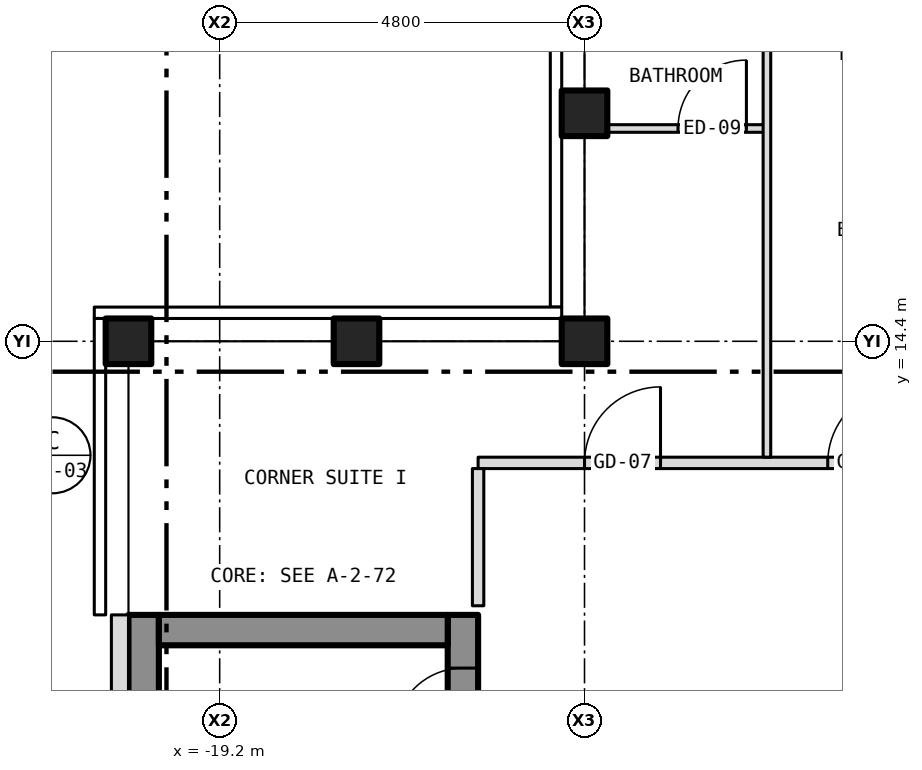
"""IFC4 building model, lengths in metres.
Left out: names, types, materials, properties, quantities, classifications, styles, units other than length and angle.
Written with IfcOpenShell. Run it as: python <this file> out.ifc"""

import sys

from ifc_helpers import new_model, si_unit, direction, frame, frame_2d, origin, origin_2d, place, context, subcontext, project, spatial, rectangle, hollow_rectangle, extrude, element, fill, save


model = new_model("IFC4")
c1 = context("Model", 3, precision=1e-05, world=origin(), true_north=direction((0.0, 1.0)))
c2 = subcontext(c1, "Body", "Model", "MODEL_VIEW")
j1 = project(units=[si_unit("LENGTHUNIT", "METRE"), si_unit("PLANEANGLEUNIT", "RADIAN")], contexts=[c1])
p1 = place(None, origin())
s1 = spatial("IfcSite", under=j1, at=p1, CompositionType="ELEMENT")
p2 = place(p1, origin())
s2 = spatial("IfcBuilding", under=s1, at=p2, CompositionType="ELEMENT")
p3 = place(p2, frame((0.0, 0.0, 262.0)))
s3 = spatial("IfcBuildingStorey", under=s2, at=p3, CompositionType="ELEMENT", Elevation=262.0)
for number, where, z_axis, x_axis in (
    (1, (-20.4, 14.4, -0.15), (0.0, 0.0, 1.0), (1.0, 0.0, 0.0)),
    (2, (-14.4, 14.4, -0.15), (0.0, 0.0, 1.0), (1.0, 0.0, 0.0)),
    (3, (-14.4, 17.4, -0.15), (0.0, 0.0, 1.0), (1.0, 0.0, 0.0)),
    (4, (-17.4, 14.4, -0.15), (0.0, 0.0, 1.0), (1.0, 0.0, 0.0)),
):
    element("IfcColumn", number, at=place(p3, frame(where, z_axis=z_axis, x_axis=x_axis)), inside=s3, PredefinedType="COLUMN", context=c2, shape_type="SweptSolid", body=[
        extrude(hollow_rectangle(XDim=0.6, YDim=0.6, WallThickness=0.03, at=origin_2d()), origin(), (0.0, 0.0, 1.0), 3.4),
    ])
p4 = place(p3, frame((-16.0, -10.8, 0.0), z_axis=(0.0, 0.0, 1.0), x_axis=(0.0, 1.0, 0.0)))
e5 = element("IfcWall", 5, at=p4, inside=s3, PredefinedType="SHEAR", context=c2, shape_type="SweptSolid", body=[
    extrude(rectangle(XDim=21.6, YDim=0.4, at=frame_2d((10.8, 0.0))), origin(), (0.0, 0.0, 1.0), 3.25),
])
p5 = place(p4, frame((9.4, 0.0, 0.0)))
e6 = element("IfcOpeningElement", 6, at=p5, cuts=e5, PredefinedType="OPENING", context=c2, shape_type="SweptSolid", body=[
    extrude(rectangle(XDim=1.1, YDim=2.1, at=frame_2d((0.55, 1.05))), frame((0.0, 0.212, 0.0), z_axis=(0.0, -1.0, 0.0), x_axis=(1.0, 0.0, 0.0)), (0.0, 0.0, 1.0), 0.424),
])
p6 = place(p4, frame((11.5, 0.0, 0.0)))
e7 = element("IfcOpeningElement", 7, at=p6, cuts=e5, PredefinedType="OPENING", context=c2, shape_type="SweptSolid", body=[
    extrude(rectangle(XDim=1.1, YDim=2.1, at=frame_2d((0.55, 1.05))), frame((0.0, 0.212, 0.0), z_axis=(0.0, -1.0, 0.0), x_axis=(1.0, 0.0, 0.0)), (0.0, 0.0, 1.0), 0.424),
])
p7 = place(p4, frame((13.6, 0.0, 0.0)))
e8 = element("IfcOpeningElement", 8, at=p7, cuts=e5, PredefinedType="OPENING", context=c2, shape_type="SweptSolid", body=[
    extrude(rectangle(XDim=1.1, YDim=2.1, at=frame_2d((0.55, 1.05))), frame((0.0, 0.212, 0.0), z_axis=(0.0, -1.0, 0.0), x_axis=(1.0, 0.0, 0.0)), (0.0, 0.0, 1.0), 0.424),
])
p8 = place(p4, frame((15.7, 0.0, 0.0)))
e9 = element("IfcOpeningElement", 9, at=p8, cuts=e5, PredefinedType="OPENING", context=c2, shape_type="SweptSolid", body=[
    extrude(rectangle(XDim=1.1, YDim=2.1, at=frame_2d((0.55, 1.05))), frame((0.0, 0.212, 0.0), z_axis=(0.0, -1.0, 0.0), x_axis=(1.0, 0.0, 0.0)), (0.0, 0.0, 1.0), 0.424),
])
p9 = place(p4, frame((17.8, 0.0, 0.0)))
e10 = element("IfcOpeningElement", 10, at=p9, cuts=e5, PredefinedType="OPENING", context=c2, shape_type="SweptSolid", body=[
    extrude(rectangle(XDim=1.1, YDim=2.1, at=frame_2d((0.55, 1.05))), frame((0.0, 0.212, 0.0), z_axis=(0.0, -1.0, 0.0), x_axis=(1.0, 0.0, 0.0)), (0.0, 0.0, 1.0), 0.424),
])
p10 = place(p4, frame((0.458, 0.0, 0.0)))
e11 = element("IfcOpeningElement", 11, at=p10, cuts=e5, PredefinedType="OPENING", context=c2, shape_type="SweptSolid", body=[
    extrude(rectangle(XDim=1.1, YDim=2.1, at=frame_2d((0.55, 1.05))), frame((0.0, 0.212, 0.0), z_axis=(0.0, -1.0, 0.0), x_axis=(1.0, 0.0, 0.0)), (0.0, 0.0, 1.0), 0.424),
])
p11 = place(p4, frame((7.5, 0.0, 0.0)))
e12 = element("IfcOpeningElement", 12, at=p11, cuts=e5, PredefinedType="OPENING", context=c2, shape_type="SweptSolid", body=[
    extrude(rectangle(XDim=1.1, YDim=2.1, at=frame_2d((0.55, 1.05))), frame((0.0, 0.212, 0.0), z_axis=(0.0, -1.0, 0.0), x_axis=(1.0, 0.0, 0.0)), (0.0, 0.0, 1.0), 0.424),
])
p12 = place(p4, frame((20.0, 0.0, 0.0)))
e13 = element("IfcOpeningElement", 13, at=p12, cuts=e5, PredefinedType="OPENING", context=c2, shape_type="SweptSolid", body=[
    extrude(rectangle(XDim=0.9, YDim=2.1, at=frame_2d((0.45, 1.05))), frame((0.0, 0.212, 0.0), z_axis=(0.0, -1.0, 0.0), x_axis=(1.0, 0.0, 0.0)), (0.0, 0.0, 1.0), 0.424),
])
p13 = place(p3, frame((-20.2, -10.8, 0.0), z_axis=(0.0, 0.0, 1.0), x_axis=(0.0, 1.0, 0.0)))
e14 = element("IfcWall", 14, at=p13, inside=s3, PredefinedType="SHEAR", context=c2, shape_type="SweptSolid", body=[
    extrude(rectangle(XDim=21.6, YDim=0.4, at=frame_2d((10.8, 0.0))), origin(), (0.0, 0.0, 1.0), 3.25),
])
p14 = place(p3, frame((-20.0, 10.6, 0.0), z_axis=(0.0, 0.0, 1.0), x_axis=(1.0, 0.0, 0.0)))
e15 = element("IfcWall", 15, at=p14, inside=s3, PredefinedType="SHEAR", context=c2, shape_type="SweptSolid", body=[
    extrude(rectangle(XDim=3.8, YDim=0.4, at=frame_2d((1.9, 0.0))), origin(), (0.0, 0.0, 1.0), 3.25),
])
p15 = place(p3, frame((-20.512, 10.8, 0.0), z_axis=(0.0, 0.0, 1.0), x_axis=(0.0, -1.0, 0.0)))
e16 = element("IfcWall", 16, at=p15, inside=s3, PredefinedType="SOLIDWALL", context=c2, shape_type="SweptSolid", body=[
    extrude(rectangle(XDim=21.6, YDim=0.225, at=frame_2d((10.8, 0.0))), origin(), (0.0, 0.0, 1.0), 3.5),
])
p16 = place(p15, frame((18.05, 0.0, 1.0)))
e17 = element("IfcOpeningElement", 17, at=p16, cuts=e16, PredefinedType="OPENING", context=c2, shape_type="SweptSolid", body=[
    extrude(rectangle(XDim=0.6, YDim=1.5, at=frame_2d((0.3, 0.75))), frame((0.0, 0.125, 0.0), z_axis=(0.0, -1.0, 0.0), x_axis=(1.0, 0.0, 0.0)), (0.0, 0.0, 1.0), 0.249),
])
p17 = place(p3, frame((-15.8, 12.8, 0.0), z_axis=(0.0, 0.0, 1.0), x_axis=(1.0, 0.0, 0.0)))
e18 = element("IfcWall", 18, at=p17, inside=s3, PredefinedType="PARTITIONING", context=c2, shape_type="SweptSolid", body=[
    extrude(rectangle(XDim=31.6, YDim=0.15, at=frame_2d((15.8, 0.0))), origin(), (0.0, 0.0, 1.0), 3.25),
])
p18 = place(p17, frame((4.6, 0.0, 0.0)))
e19 = element("IfcOpeningElement", 19, at=p18, cuts=e18, PredefinedType="OPENING", context=c2, shape_type="SweptSolid", body=[
    extrude(rectangle(XDim=1.0, YDim=2.1, at=frame_2d((0.5, 1.05))), frame((0.0, 0.087, 0.0), z_axis=(0.0, -1.0, 0.0), x_axis=(1.0, 0.0, 0.0)), (0.0, 0.0, 1.0), 0.174),
])
p19 = place(p17, frame((10.6, 0.0, 0.0)))
e20 = element("IfcOpeningElement", 20, at=p19, cuts=e18, PredefinedType="OPENING", context=c2, shape_type="SweptSolid", body=[
    extrude(rectangle(XDim=1.0, YDim=2.1, at=frame_2d((0.5, 1.05))), frame((0.0, 0.087, 0.0), z_axis=(0.0, -1.0, 0.0), x_axis=(1.0, 0.0, 0.0)), (0.0, 0.0, 1.0), 0.174),
])
p20 = place(p17, frame((17.8, 0.0, 0.0)))
e21 = element("IfcOpeningElement", 21, at=p20, cuts=e18, PredefinedType="OPENING", context=c2, shape_type="SweptSolid", body=[
    extrude(rectangle(XDim=1.0, YDim=2.1, at=frame_2d((0.5, 1.05))), frame((0.0, 0.087, 0.0), z_axis=(0.0, -1.0, 0.0), x_axis=(1.0, 0.0, 0.0)), (0.0, 0.0, 1.0), 0.174),
])
p21 = place(p17, frame((26.0, 0.0, 0.0)))
e22 = element("IfcOpeningElement", 22, at=p21, cuts=e18, PredefinedType="OPENING", context=c2, shape_type="SweptSolid", body=[
    extrude(rectangle(XDim=1.0, YDim=2.1, at=frame_2d((0.5, 1.05))), frame((0.0, 0.087, 0.0), z_axis=(0.0, -1.0, 0.0), x_axis=(1.0, 0.0, 0.0)), (0.0, 0.0, 1.0), 0.174),
])
p22 = place(p17, frame((1.4, 0.0, 0.0)))
e23 = element("IfcOpeningElement", 23, at=p22, cuts=e18, PredefinedType="OPENING", context=c2, shape_type="SweptSolid", body=[
    extrude(rectangle(XDim=1.0, YDim=2.1, at=frame_2d((0.5, 1.05))), frame((0.0, 0.087, 0.0), z_axis=(0.0, -1.0, 0.0), x_axis=(1.0, 0.0, 0.0)), (0.0, 0.0, 1.0), 0.174),
])
p23 = place(p17, frame((29.2, 0.0, 0.0)))
e24 = element("IfcOpeningElement", 24, at=p23, cuts=e18, PredefinedType="OPENING", context=c2, shape_type="SweptSolid", body=[
    extrude(rectangle(XDim=1.0, YDim=2.1, at=frame_2d((0.5, 1.05))), frame((0.0, 0.087, 0.0), z_axis=(0.0, -1.0, 0.0), x_axis=(1.0, 0.0, 0.0)), (0.0, 0.0, 1.0), 0.174),
])
p24 = place(p3, frame((-14.28, 17.2, 0.0), z_axis=(0.0, 0.0, 1.0), x_axis=(1.0, 0.0, 0.0)))
e25 = element("IfcWall", 25, at=p24, inside=s3, PredefinedType="PARTITIONING", context=c2, shape_type="SweptSolid", body=[
    extrude(rectangle(XDim=2.28, YDim=0.1, at=frame_2d((1.14, 0.0))), origin(), (0.0, 0.0, 1.0), 3.25),
])
p25 = place(p24, frame((1.11, 0.0, 0.0)))
e26 = element("IfcOpeningElement", 26, at=p25, cuts=e25, PredefinedType="OPENING", context=c2, shape_type="SweptSolid", body=[
    extrude(rectangle(XDim=0.9, YDim=2.1, at=frame_2d((0.45, 1.05))), frame((0.0, 0.062, 0.0), z_axis=(0.0, -1.0, 0.0), x_axis=(1.0, 0.0, 0.0)), (0.0, 0.0, 1.0), 0.124),
])
p26 = place(p3, frame((-15.8, 10.92, 0.0), z_axis=(0.0, 0.0, 1.0), x_axis=(0.0, 1.0, 0.0)))
e27 = element("IfcWall", 27, at=p26, inside=s3, PredefinedType="PARTITIONING", context=c2, shape_type="SweptSolid", body=[
    extrude(rectangle(XDim=1.805, YDim=0.15, at=frame_2d((0.903, 0.0))), origin(), (0.0, 0.0, 1.0), 3.25),
])
p27 = place(p3, frame((-12.0, 12.875, 0.0), z_axis=(0.0, 0.0, 1.0), x_axis=(0.0, 1.0, 0.0)))
e28 = element("IfcWall", 28, at=p27, inside=s3, PredefinedType="PARTITIONING", context=c2, shape_type="SweptSolid", body=[
    extrude(rectangle(XDim=7.855, YDim=0.1, at=frame_2d((3.927, 0.0))), origin(), (0.0, 0.0, 1.0), 3.25),
])
p28 = place(p12, origin())
e29 = element("IfcDoor", 29, at=p28, inside=s3, OperationType="SINGLE_SWING_LEFT", PredefinedType="DOOR", context=c2, shape_type="SweptSolid", body=[
    extrude(rectangle(XDim=0.9, YDim=2.1, at=frame_2d((0.45, 1.05))), frame((0.0, 0.025, 0.0), z_axis=(0.0, -1.0, 0.0), x_axis=(1.0, 0.0, 0.0)), (0.0, 0.0, 1.0), 0.05),
])
fill(e13, e29)
p29 = place(p18, origin())
e30 = element("IfcDoor", 30, at=p29, inside=s3, OperationType="SINGLE_SWING_RIGHT", PredefinedType="DOOR", context=c2, shape_type="SweptSolid", body=[
    extrude(rectangle(XDim=1.0, YDim=2.1, at=frame_2d((0.5, 1.05))), frame((0.0, 0.025, 0.0), z_axis=(0.0, -1.0, 0.0), x_axis=(1.0, 0.0, 0.0)), (0.0, 0.0, 1.0), 0.05),
])
fill(e19, e30)
p30 = place(p25, origin())
e31 = element("IfcDoor", 31, at=p30, inside=s3, OperationType="SINGLE_SWING_RIGHT", PredefinedType="DOOR", context=c2, shape_type="SweptSolid", body=[
    extrude(rectangle(XDim=0.9, YDim=2.1, at=frame_2d((0.45, 1.05))), frame((0.0, 0.025, 0.0), z_axis=(0.0, -1.0, 0.0), x_axis=(1.0, 0.0, 0.0)), (0.0, 0.0, 1.0), 0.05),
])
fill(e26, e31)
p31 = place(p22, origin())
e32 = element("IfcDoor", 32, at=p31, inside=s3, OperationType="SINGLE_SWING_RIGHT", PredefinedType="DOOR", context=c2, shape_type="SweptSolid", body=[
    extrude(rectangle(XDim=1.0, YDim=2.1, at=frame_2d((0.5, 1.05))), frame((0.0, 0.025, 0.0), z_axis=(0.0, -1.0, 0.0), x_axis=(1.0, 0.0, 0.0)), (0.0, 0.0, 1.0), 0.05),
])
fill(e23, e32)
save(model, sys.argv[1])
